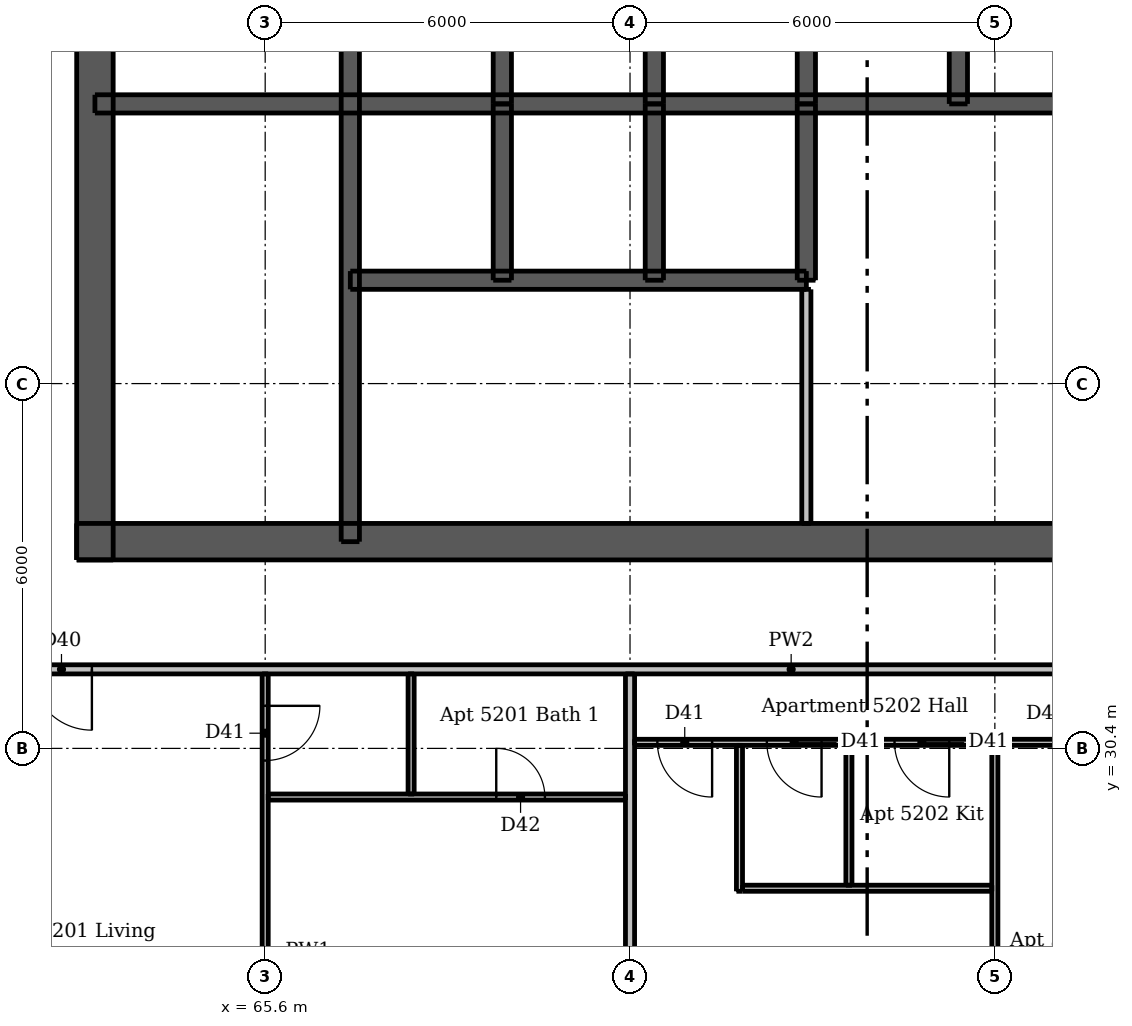
"""IFC4 building model, lengths in metres.
Left out: names, types, materials, properties, quantities, classifications, styles, units other than length and angle.
Written with IfcOpenShell. Run it as: python <this file> out.ifc"""

import sys

from ifc_helpers import new_model, si_unit, direction, frame, frame_2d, origin, place, context, subcontext, project, spatial, rectangle, extrude, element, fill, save


model = new_model("IFC4")
c1 = context("Model", 3, precision=1e-05, world=origin(), true_north=direction((0.0, 1.0)))
c2 = subcontext(c1, "Body", "Model", "MODEL_VIEW")
j1 = project(units=[si_unit("LENGTHUNIT", "METRE"), si_unit("PLANEANGLEUNIT", "RADIAN")], contexts=[c1])
p1 = place(None, origin())
s1 = spatial("IfcSite", under=j1, at=p1, CompositionType="ELEMENT")
p2 = place(p1, origin())
s2 = spatial("IfcBuilding", under=s1, at=p2, CompositionType="ELEMENT")
p3 = place(p2, frame((0.0, 0.0, 196.9)))
s3 = spatial("IfcBuildingStorey", under=s2, at=p3, CompositionType="ELEMENT", Elevation=196.9)
p4 = place(p3, frame((62.5, 33.8, 0.0), z_axis=(0.0, 0.0, 1.0), x_axis=(1.0, 0.0, 0.0)))
e1 = element("IfcWall", 1, at=p4, inside=s3, PredefinedType="SHEAR", context=c2, shape_type="SweptSolid", body=[
    extrude(rectangle(XDim=24.0, YDim=0.6, at=frame_2d((12.0, 0.0))), origin(), (0.0, 0.0, 1.0), 3.05),
])
p5 = place(p4, frame((1.925, 0.0, 0.0)))
e2 = element("IfcOpeningElement", 2, at=p5, cuts=e1, PredefinedType="OPENING", context=c2, shape_type="SweptSolid", body=[
    extrude(rectangle(XDim=1.1, YDim=2.1, at=frame_2d((0.55, 1.05))), frame((0.0, 0.31, 0.0), z_axis=(0.0, -1.0, 0.0), x_axis=(1.0, 0.0, 0.0)), (0.0, 0.0, 1.0), 0.62),
])
p6 = place(p4, frame((20.975, 0.0, 0.0)))
e3 = element("IfcOpeningElement", 3, at=p6, cuts=e1, PredefinedType="OPENING", context=c2, shape_type="SweptSolid", body=[
    extrude(rectangle(XDim=1.1, YDim=2.1, at=frame_2d((0.55, 1.05))), frame((0.0, 0.31, 0.0), z_axis=(0.0, -1.0, 0.0), x_axis=(1.0, 0.0, 0.0)), (0.0, 0.0, 1.0), 0.62),
])
p7 = place(p4, frame((8.0, 0.0, 0.0)))
e4 = element("IfcOpeningElement", 4, at=p7, cuts=e1, PredefinedType="OPENING", context=c2, shape_type="SweptSolid", body=[
    extrude(rectangle(XDim=1.1, YDim=2.1, at=frame_2d((0.55, 1.05))), frame((0.0, 0.31, 0.0), z_axis=(0.0, -1.0, 0.0), x_axis=(1.0, 0.0, 0.0)), (0.0, 0.0, 1.0), 0.62),
])
p8 = place(p4, frame((15.3, 0.0, 0.0)))
e5 = element("IfcOpeningElement", 5, at=p8, cuts=e1, PredefinedType="OPENING", context=c2, shape_type="SweptSolid", body=[
    extrude(rectangle(XDim=0.9, YDim=2.1, at=frame_2d((0.45, 1.05))), frame((0.0, 0.31, 0.0), z_axis=(0.0, -1.0, 0.0), x_axis=(1.0, 0.0, 0.0)), (0.0, 0.0, 1.0), 0.62),
])
p9 = place(p3, frame((62.8, 33.5, 0.0), z_axis=(0.0, 0.0, 1.0), x_axis=(0.0, 1.0, 0.0)))
e6 = element("IfcWall", 6, at=p9, inside=s3, PredefinedType="SHEAR", context=c2, shape_type="SweptSolid", body=[
    extrude(rectangle(XDim=24.0, YDim=0.6, at=frame_2d((12.0, 0.0))), origin(), (0.0, 0.0, 1.0), 3.05),
])
p10 = place(p9, frame((11.2, 0.0, 0.0)))
e7 = element("IfcOpeningElement", 7, at=p10, cuts=e6, PredefinedType="OPENING", context=c2, shape_type="SweptSolid", body=[
    extrude(rectangle(XDim=1.6, YDim=2.1, at=frame_2d((0.8, 1.05))), frame((0.0, 0.31, 0.0), z_axis=(0.0, -1.0, 0.0), x_axis=(1.0, 0.0, 0.0)), (0.0, 0.0, 1.0), 0.62),
])
p11 = place(p3, frame((62.8, 41.0, 0.0), z_axis=(0.0, 0.0, 1.0), x_axis=(1.0, 0.0, 0.0)))
e8 = element("IfcWall", 8, at=p11, inside=s3, PredefinedType="SHEAR", context=c2, shape_type="SweptSolid", body=[
    extrude(rectangle(XDim=23.4, YDim=0.3, at=frame_2d((11.7, 0.0))), origin(), (0.0, 0.0, 1.0), 3.05),
])
p12 = place(p3, frame((67.0, 33.8, 0.0), z_axis=(0.0, 0.0, 1.0), x_axis=(0.0, 1.0, 0.0)))
e9 = element("IfcWall", 9, at=p12, inside=s3, PredefinedType="SHEAR", context=c2, shape_type="SweptSolid", body=[
    extrude(rectangle(XDim=10.1, YDim=0.3, at=frame_2d((5.05, 0.0))), origin(), (0.0, 0.0, 1.0), 3.05),
])
p13 = place(p12, frame((0.5, 0.0, 0.0)))
e10 = element("IfcOpeningElement", 10, at=p13, cuts=e9, PredefinedType="OPENING", context=c2, shape_type="SweptSolid", body=[
    extrude(rectangle(XDim=1.1, YDim=2.1, at=frame_2d((0.55, 1.05))), frame((0.0, 0.16, 0.0), z_axis=(0.0, -1.0, 0.0), x_axis=(1.0, 0.0, 0.0)), (0.0, 0.0, 1.0), 0.32),
])
for number, where, z_axis, x_axis in (
    (11, (69.5, 41.0, 0.0), (0.0, 0.0, 1.0), (0.0, 1.0, 0.0)),
    (12, (72.0, 41.0, 0.0), (0.0, 0.0, 1.0), (0.0, 1.0, 0.0)),
    (13, (74.5, 41.0, 0.0), (0.0, 0.0, 1.0), (0.0, 1.0, 0.0)),
    (14, (77.0, 41.0, 0.0), (0.0, 0.0, 1.0), (0.0, 1.0, 0.0)),
):
    element("IfcWall", number, at=place(p3, frame(where, z_axis=z_axis, x_axis=x_axis)), inside=s3, PredefinedType="SHEAR", context=c2, shape_type="SweptSolid", body=[
        extrude(rectangle(XDim=2.9, YDim=0.3, at=frame_2d((1.45, 0.0))), origin(), (0.0, 0.0, 1.0), 3.05),
    ])
p14 = place(p3, frame((67.0, 38.1, 0.0), z_axis=(0.0, 0.0, 1.0), x_axis=(1.0, 0.0, 0.0)))
e15 = element("IfcWall", 15, at=p14, inside=s3, PredefinedType="SHEAR", context=c2, shape_type="SweptSolid", body=[
    extrude(rectangle(XDim=7.5, YDim=0.3, at=frame_2d((3.75, 0.0))), origin(), (0.0, 0.0, 1.0), 3.05),
])
p15 = place(p14, frame((0.7, 0.0, 0.0)))
e16 = element("IfcOpeningElement", 16, at=p15, cuts=e15, PredefinedType="OPENING", context=c2, shape_type="SweptSolid", body=[
    extrude(rectangle(XDim=1.1, YDim=2.1, at=frame_2d((0.55, 1.05))), frame((0.0, 0.16, 0.0), z_axis=(0.0, -1.0, 0.0), x_axis=(1.0, 0.0, 0.0)), (0.0, 0.0, 1.0), 0.32),
])
p16 = place(p14, frame((3.2, 0.0, 0.0)))
e17 = element("IfcOpeningElement", 17, at=p16, cuts=e15, PredefinedType="OPENING", context=c2, shape_type="SweptSolid", body=[
    extrude(rectangle(XDim=1.1, YDim=2.1, at=frame_2d((0.55, 1.05))), frame((0.0, 0.16, 0.0), z_axis=(0.0, -1.0, 0.0), x_axis=(1.0, 0.0, 0.0)), (0.0, 0.0, 1.0), 0.32),
])
p17 = place(p14, frame((5.65, 0.0, 0.0)))
e18 = element("IfcOpeningElement", 18, at=p17, cuts=e15, PredefinedType="OPENING", context=c2, shape_type="SweptSolid", body=[
    extrude(rectangle(XDim=1.2, YDim=2.1, at=frame_2d((0.6, 1.05))), frame((0.0, 0.16, 0.0), z_axis=(0.0, -1.0, 0.0), x_axis=(1.0, 0.0, 0.0)), (0.0, 0.0, 1.0), 0.32),
])
for number, where, z_axis, x_axis in (
    (19, (69.5, 38.1, 0.0), (0.0, 0.0, 1.0), (0.0, 1.0, 0.0)),
    (20, (72.0, 38.1, 0.0), (0.0, 0.0, 1.0), (0.0, 1.0, 0.0)),
    (21, (74.5, 38.1, 0.0), (0.0, 0.0, 1.0), (0.0, 1.0, 0.0)),
):
    element("IfcWall", number, at=place(p3, frame(where, z_axis=z_axis, x_axis=x_axis)), inside=s3, PredefinedType="SHEAR", context=c2, shape_type="SweptSolid", body=[
        extrude(rectangle(XDim=2.9, YDim=0.3, at=frame_2d((1.45, 0.0))), origin(), (0.0, 0.0, 1.0), 3.05),
    ])
p18 = place(p3, frame((74.5, 34.1, 0.0), z_axis=(0.0, 0.0, 1.0), x_axis=(0.0, 1.0, 0.0)))
e22 = element("IfcWall", 22, at=p18, inside=s3, PredefinedType="PLUMBINGWALL", context=c2, shape_type="SweptSolid", body=[
    extrude(rectangle(XDim=3.85, YDim=0.15, at=frame_2d((1.925, 0.0))), origin(), (0.0, 0.0, 1.0), 3.05),
])
p19 = place(p3, frame((65.6, 31.625, 0.0), z_axis=(0.0, 0.0, 1.0), x_axis=(0.0, -1.0, 0.0)))
e23 = element("IfcWall", 23, at=p19, inside=s3, PredefinedType="PARTITIONING", context=c2, shape_type="SweptSolid", body=[
    extrude(rectangle(XDim=9.125, YDim=0.1, at=frame_2d((4.562, 0.0))), origin(), (0.0, 0.0, 1.0), 2.516),
])
p20 = place(p19, frame((0.525, 0.0, 0.0)))
e24 = element("IfcOpeningElement", 24, at=p20, cuts=e23, PredefinedType="OPENING", context=c2, shape_type="SweptSolid", body=[
    extrude(rectangle(XDim=0.9, YDim=2.1, at=frame_2d((0.45, 1.05))), frame((0.0, 0.06, 0.0), z_axis=(0.0, -1.0, 0.0), x_axis=(1.0, 0.0, 0.0)), (0.0, 0.0, 1.0), 0.12),
])
p21 = place(p19, frame((5.125, 0.0, 0.0)))
e25 = element("IfcOpeningElement", 25, at=p21, cuts=e23, PredefinedType="OPENING", context=c2, shape_type="SweptSolid", body=[
    extrude(rectangle(XDim=0.9, YDim=2.1, at=frame_2d((0.45, 1.05))), frame((0.0, 0.06, 0.0), z_axis=(0.0, -1.0, 0.0), x_axis=(1.0, 0.0, 0.0)), (0.0, 0.0, 1.0), 0.12),
])
p22 = place(p3, frame((68.0, 29.65, 0.0), z_axis=(0.0, 0.0, 1.0), x_axis=(0.0, 1.0, 0.0)))
e26 = element("IfcWall", 26, at=p22, inside=s3, PredefinedType="PARTITIONING", context=c2, shape_type="SweptSolid", body=[
    extrude(rectangle(XDim=1.975, YDim=0.1, at=frame_2d((0.988, 0.0))), origin(), (0.0, 0.0, 1.0), 3.05),
])
p23 = place(p3, frame((73.4, 28.05, 0.0), z_axis=(0.0, 0.0, 1.0), x_axis=(0.0, 1.0, 0.0)))
e27 = element("IfcWall", 27, at=p23, inside=s3, PredefinedType="PARTITIONING", context=c2, shape_type="SweptSolid", body=[
    extrude(rectangle(XDim=2.4, YDim=0.1, at=frame_2d((1.2, 0.0))), origin(), (0.0, 0.0, 1.0), 3.05),
])
p24 = place(p3, frame((75.2, 28.15, 0.0), z_axis=(0.0, 0.0, 1.0), x_axis=(0.0, 1.0, 0.0)))
e28 = element("IfcWall", 28, at=p24, inside=s3, PredefinedType="PARTITIONING", context=c2, shape_type="SweptSolid", body=[
    extrude(rectangle(XDim=2.3, YDim=0.1, at=frame_2d((1.15, 0.0))), origin(), (0.0, 0.0, 1.0), 3.05),
])
p25 = place(p3, frame((77.6, 24.0, 0.0), z_axis=(0.0, 0.0, 1.0), x_axis=(0.0, 1.0, 0.0)))
e29 = element("IfcWall", 29, at=p25, inside=s3, PredefinedType="PARTITIONING", context=c2, shape_type="SweptSolid", body=[
    extrude(rectangle(XDim=6.45, YDim=0.1, at=frame_2d((3.225, 0.0))), origin(), (0.0, 0.0, 1.0), 2.59),
])
p26 = place(p3, frame((88.25, 30.5, 0.0), z_axis=(0.0, 0.0, 1.0), x_axis=(-1.0, 0.0, 0.0)))
e30 = element("IfcWall", 30, at=p26, inside=s3, PredefinedType="PARTITIONING", context=c2, shape_type="SweptSolid", body=[
    extrude(rectangle(XDim=16.575, YDim=0.1, at=frame_2d((8.288, 0.0))), origin(), (0.0, 0.0, 1.0), 3.05),
])
p27 = place(p26, frame((15.3, 0.0, 0.0)))
e31 = element("IfcOpeningElement", 31, at=p27, cuts=e30, PredefinedType="OPENING", context=c2, shape_type="SweptSolid", body=[
    extrude(rectangle(XDim=0.9, YDim=2.1, at=frame_2d((0.45, 1.05))), frame((0.0, 0.06, 0.0), z_axis=(0.0, -1.0, 0.0), x_axis=(1.0, 0.0, 0.0)), (0.0, 0.0, 1.0), 0.12),
])
p28 = place(p26, frame((11.4, 0.0, 0.0)))
e32 = element("IfcOpeningElement", 32, at=p28, cuts=e30, PredefinedType="OPENING", context=c2, shape_type="SweptSolid", body=[
    extrude(rectangle(XDim=0.9, YDim=2.1, at=frame_2d((0.45, 1.05))), frame((0.0, 0.06, 0.0), z_axis=(0.0, -1.0, 0.0), x_axis=(1.0, 0.0, 0.0)), (0.0, 0.0, 1.0), 0.12),
])
p29 = place(p26, frame((13.5, 0.0, 0.0)))
e33 = element("IfcOpeningElement", 33, at=p29, cuts=e30, PredefinedType="OPENING", context=c2, shape_type="SweptSolid", body=[
    extrude(rectangle(XDim=0.9, YDim=2.1, at=frame_2d((0.45, 1.05))), frame((0.0, 0.06, 0.0), z_axis=(0.0, -1.0, 0.0), x_axis=(1.0, 0.0, 0.0)), (0.0, 0.0, 1.0), 0.12),
])
p30 = place(p26, frame((8.7, 0.0, 0.0)))
e34 = element("IfcOpeningElement", 34, at=p30, cuts=e30, PredefinedType="OPENING", context=c2, shape_type="SweptSolid", body=[
    extrude(rectangle(XDim=0.9, YDim=2.1, at=frame_2d((0.45, 1.05))), frame((0.0, 0.06, 0.0), z_axis=(0.0, -1.0, 0.0), x_axis=(1.0, 0.0, 0.0)), (0.0, 0.0, 1.0), 0.12),
])
p31 = place(p26, frame((3.0, 0.0, 0.0)))
e35 = element("IfcOpeningElement", 35, at=p31, cuts=e30, PredefinedType="OPENING", context=c2, shape_type="SweptSolid", body=[
    extrude(rectangle(XDim=0.9, YDim=2.1, at=frame_2d((0.45, 1.05))), frame((0.0, 0.06, 0.0), z_axis=(0.0, -1.0, 0.0), x_axis=(1.0, 0.0, 0.0)), (0.0, 0.0, 1.0), 0.12),
])
p32 = place(p26, frame((0.35, 0.0, 0.0)))
e36 = element("IfcOpeningElement", 36, at=p32, cuts=e30, PredefinedType="OPENING", context=c2, shape_type="SweptSolid", body=[
    extrude(rectangle(XDim=0.9, YDim=2.1, at=frame_2d((0.45, 1.05))), frame((0.0, 0.06, 0.0), z_axis=(0.0, -1.0, 0.0), x_axis=(1.0, 0.0, 0.0)), (0.0, 0.0, 1.0), 0.12),
])
p33 = place(p26, frame((6.05, 0.0, 0.0)))
e37 = element("IfcOpeningElement", 37, at=p33, cuts=e30, PredefinedType="OPENING", context=c2, shape_type="SweptSolid", body=[
    extrude(rectangle(XDim=0.8, YDim=2.1, at=frame_2d((0.4, 1.05))), frame((0.0, 0.06, 0.0), z_axis=(0.0, -1.0, 0.0), x_axis=(1.0, 0.0, 0.0)), (0.0, 0.0, 1.0), 0.12),
])
p34 = place(p3, frame((65.65, 29.6, 0.0), z_axis=(0.0, 0.0, 1.0), x_axis=(1.0, 0.0, 0.0)))
e38 = element("IfcWall", 38, at=p34, inside=s3, PredefinedType="PARTITIONING", context=c2, shape_type="SweptSolid", body=[
    extrude(rectangle(XDim=5.875, YDim=0.1, at=frame_2d((2.938, 0.0))), origin(), (0.0, 0.0, 1.0), 3.05),
])
p35 = place(p34, frame((3.75, 0.0, 0.0)))
e39 = element("IfcOpeningElement", 39, at=p35, cuts=e38, PredefinedType="OPENING", context=c2, shape_type="SweptSolid", body=[
    extrude(rectangle(XDim=0.8, YDim=2.1, at=frame_2d((0.4, 1.05))), frame((0.0, 0.06, 0.0), z_axis=(0.0, -1.0, 0.0), x_axis=(1.0, 0.0, 0.0)), (0.0, 0.0, 1.0), 0.12),
])
p36 = place(p3, frame((73.45, 28.1, 0.0), z_axis=(0.0, 0.0, 1.0), x_axis=(1.0, 0.0, 0.0)))
e40 = element("IfcWall", 40, at=p36, inside=s3, PredefinedType="PARTITIONING", context=c2, shape_type="SweptSolid", body=[
    extrude(rectangle(XDim=4.1, YDim=0.1, at=frame_2d((2.05, 0.0))), origin(), (0.0, 0.0, 1.0), 3.05),
])
p37 = place(p3, frame((71.6, 22.5, 0.0), z_axis=(0.0, 0.0, 1.0), x_axis=(0.0, 1.0, 0.0)))
e41 = element("IfcWall", 41, at=p37, inside=s3, PredefinedType="PARTITIONING", context=c2, shape_type="SweptSolid", body=[
    extrude(rectangle(XDim=9.125, YDim=0.15, at=frame_2d((4.562, 0.0))), origin(), (0.0, 0.0, 1.0), 2.516),
])
p38 = place(p3, frame((89.525, 31.7, 0.0), z_axis=(0.0, 0.0, 1.0), x_axis=(-1.0, 0.0, 0.0)))
e42 = element("IfcWall", 42, at=p38, inside=s3, PredefinedType="PARTITIONING", context=c2, shape_type="SweptSolid", body=[
    extrude(rectangle(XDim=30.55, YDim=0.15, at=frame_2d((15.275, 0.0))), origin(), (0.0, 0.0, 1.0), 3.05),
])
p39 = place(p38, frame((26.775, 0.0, 0.0)))
e43 = element("IfcOpeningElement", 43, at=p39, cuts=e42, PredefinedType="OPENING", context=c2, shape_type="SweptSolid", body=[
    extrude(rectangle(XDim=1.0, YDim=2.1, at=frame_2d((0.5, 1.05))), frame((0.0, 0.085, 0.0), z_axis=(0.0, -1.0, 0.0), x_axis=(1.0, 0.0, 0.0)), (0.0, 0.0, 1.0), 0.17),
])
p40 = place(p38, frame((9.075, 0.0, 0.0)))
e44 = element("IfcOpeningElement", 44, at=p40, cuts=e42, PredefinedType="OPENING", context=c2, shape_type="SweptSolid", body=[
    extrude(rectangle(XDim=1.0, YDim=2.1, at=frame_2d((0.5, 1.05))), frame((0.0, 0.085, 0.0), z_axis=(0.0, -1.0, 0.0), x_axis=(1.0, 0.0, 0.0)), (0.0, 0.0, 1.0), 0.17),
])
p41 = place(p5, origin())
e45 = element("IfcDoor", 45, at=p41, inside=s3, OperationType="SINGLE_SWING_LEFT", PredefinedType="DOOR", context=c2, shape_type="SweptSolid", body=[
    extrude(rectangle(XDim=1.1, YDim=2.1, at=frame_2d((0.55, 1.05))), frame((0.0, 0.288, 0.0), z_axis=(0.0, -1.0, 0.0), x_axis=(1.0, 0.0, 0.0)), (0.0, 0.0, 1.0), 0.05),
])
fill(e2, e45)
p42 = place(p7, origin())
e46 = element("IfcDoor", 46, at=p42, inside=s3, OperationType="SINGLE_SWING_LEFT", PredefinedType="DOOR", context=c2, shape_type="SweptSolid", body=[
    extrude(rectangle(XDim=1.1, YDim=2.1, at=frame_2d((0.55, 1.05))), frame((0.0, 0.288, 0.0), z_axis=(0.0, -1.0, 0.0), x_axis=(1.0, 0.0, 0.0)), (0.0, 0.0, 1.0), 0.05),
])
fill(e4, e46)
p43 = place(p13, origin())
e47 = element("IfcDoor", 47, at=p43, inside=s3, OperationType="SINGLE_SWING_RIGHT", PredefinedType="DOOR", context=c2, shape_type="SweptSolid", body=[
    extrude(rectangle(XDim=1.1, YDim=2.1, at=frame_2d((0.55, 1.05))), frame((0.0, -0.087, 0.0), z_axis=(0.0, -1.0, 0.0), x_axis=(1.0, 0.0, 0.0)), (0.0, 0.0, 1.0), 0.05),
])
fill(e10, e47)
p44 = place(p8, origin())
e48 = element("IfcDoor", 48, at=p44, inside=s3, OperationType="SINGLE_SWING_LEFT", PredefinedType="DOOR", context=c2, shape_type="SweptSolid", body=[
    extrude(rectangle(XDim=0.9, YDim=2.1, at=frame_2d((0.45, 1.05))), frame((0.0, 0.288, 0.0), z_axis=(0.0, -1.0, 0.0), x_axis=(1.0, 0.0, 0.0)), (0.0, 0.0, 1.0), 0.05),
])
fill(e5, e48)
p45 = place(p15, origin())
e49 = element("IfcDoor", 49, at=p45, inside=s3, OperationType="DOUBLE_DOOR_SLIDING", PredefinedType="DOOR", context=c2, shape_type="SweptSolid", body=[
    extrude(rectangle(XDim=1.1, YDim=2.1, at=frame_2d((0.55, 1.05))), frame((0.0, 0.025, 0.0), z_axis=(0.0, -1.0, 0.0), x_axis=(1.0, 0.0, 0.0)), (0.0, 0.0, 1.0), 0.05),
])
fill(e16, e49)
p46 = place(p16, origin())
e50 = element("IfcDoor", 50, at=p46, inside=s3, OperationType="DOUBLE_DOOR_SLIDING", PredefinedType="DOOR", context=c2, shape_type="SweptSolid", body=[
    extrude(rectangle(XDim=1.1, YDim=2.1, at=frame_2d((0.55, 1.05))), frame((0.0, 0.025, 0.0), z_axis=(0.0, -1.0, 0.0), x_axis=(1.0, 0.0, 0.0)), (0.0, 0.0, 1.0), 0.05),
])
fill(e17, e50)
p47 = place(p17, origin())
e51 = element("IfcDoor", 51, at=p47, inside=s3, OperationType="DOUBLE_DOOR_SLIDING", PredefinedType="DOOR", context=c2, shape_type="SweptSolid", body=[
    extrude(rectangle(XDim=1.2, YDim=2.1, at=frame_2d((0.6, 1.05))), frame((0.0, 0.025, 0.0), z_axis=(0.0, -1.0, 0.0), x_axis=(1.0, 0.0, 0.0)), (0.0, 0.0, 1.0), 0.05),
])
fill(e18, e51)
p48 = place(p39, origin())
e52 = element("IfcDoor", 52, at=p48, inside=s3, OperationType="SINGLE_SWING_LEFT", PredefinedType="DOOR", context=c2, shape_type="SweptSolid", body=[
    extrude(rectangle(XDim=1.0, YDim=2.1, at=frame_2d((0.5, 1.05))), frame((0.0, 0.025, 0.0), z_axis=(0.0, -1.0, 0.0), x_axis=(1.0, 0.0, 0.0)), (0.0, 0.0, 1.0), 0.05),
])
fill(e43, e52)
p49 = place(p20, origin())
e53 = element("IfcDoor", 53, at=p49, inside=s3, OperationType="SINGLE_SWING_LEFT", PredefinedType="DOOR", context=c2, shape_type="SweptSolid", body=[
    extrude(rectangle(XDim=0.9, YDim=2.1, at=frame_2d((0.45, 1.05))), frame((0.0, 0.025, 0.0), z_axis=(0.0, -1.0, 0.0), x_axis=(1.0, 0.0, 0.0)), (0.0, 0.0, 1.0), 0.05),
])
fill(e24, e53)
p50 = place(p35, origin())
e54 = element("IfcDoor", 54, at=p50, inside=s3, OperationType="SINGLE_SWING_LEFT", PredefinedType="DOOR", context=c2, shape_type="SweptSolid", body=[
    extrude(rectangle(XDim=0.8, YDim=2.1, at=frame_2d((0.4, 1.05))), frame((0.0, 0.025, 0.0), z_axis=(0.0, -1.0, 0.0), x_axis=(1.0, 0.0, 0.0)), (0.0, 0.0, 1.0), 0.05),
])
fill(e39, e54)
p51 = place(p27, origin())
e55 = element("IfcDoor", 55, at=p51, inside=s3, OperationType="SINGLE_SWING_LEFT", PredefinedType="DOOR", context=c2, shape_type="SweptSolid", body=[
    extrude(rectangle(XDim=0.9, YDim=2.1, at=frame_2d((0.45, 1.05))), frame((0.0, 0.025, 0.0), z_axis=(0.0, -1.0, 0.0), x_axis=(1.0, 0.0, 0.0)), (0.0, 0.0, 1.0), 0.05),
])
fill(e31, e55)
p52 = place(p28, origin())
e56 = element("IfcDoor", 56, at=p52, inside=s3, OperationType="SINGLE_SWING_LEFT", PredefinedType="DOOR", context=c2, shape_type="SweptSolid", body=[
    extrude(rectangle(XDim=0.9, YDim=2.1, at=frame_2d((0.45, 1.05))), frame((0.0, 0.025, 0.0), z_axis=(0.0, -1.0, 0.0), x_axis=(1.0, 0.0, 0.0)), (0.0, 0.0, 1.0), 0.05),
])
fill(e32, e56)
p53 = place(p29, origin())
e57 = element("IfcDoor", 57, at=p53, inside=s3, OperationType="SINGLE_SWING_LEFT", PredefinedType="DOOR", context=c2, shape_type="SweptSolid", body=[
    extrude(rectangle(XDim=0.9, YDim=2.1, at=frame_2d((0.45, 1.05))), frame((0.0, 0.025, 0.0), z_axis=(0.0, -1.0, 0.0), x_axis=(1.0, 0.0, 0.0)), (0.0, 0.0, 1.0), 0.05),
])
fill(e33, e57)
save(model, sys.argv[1])
